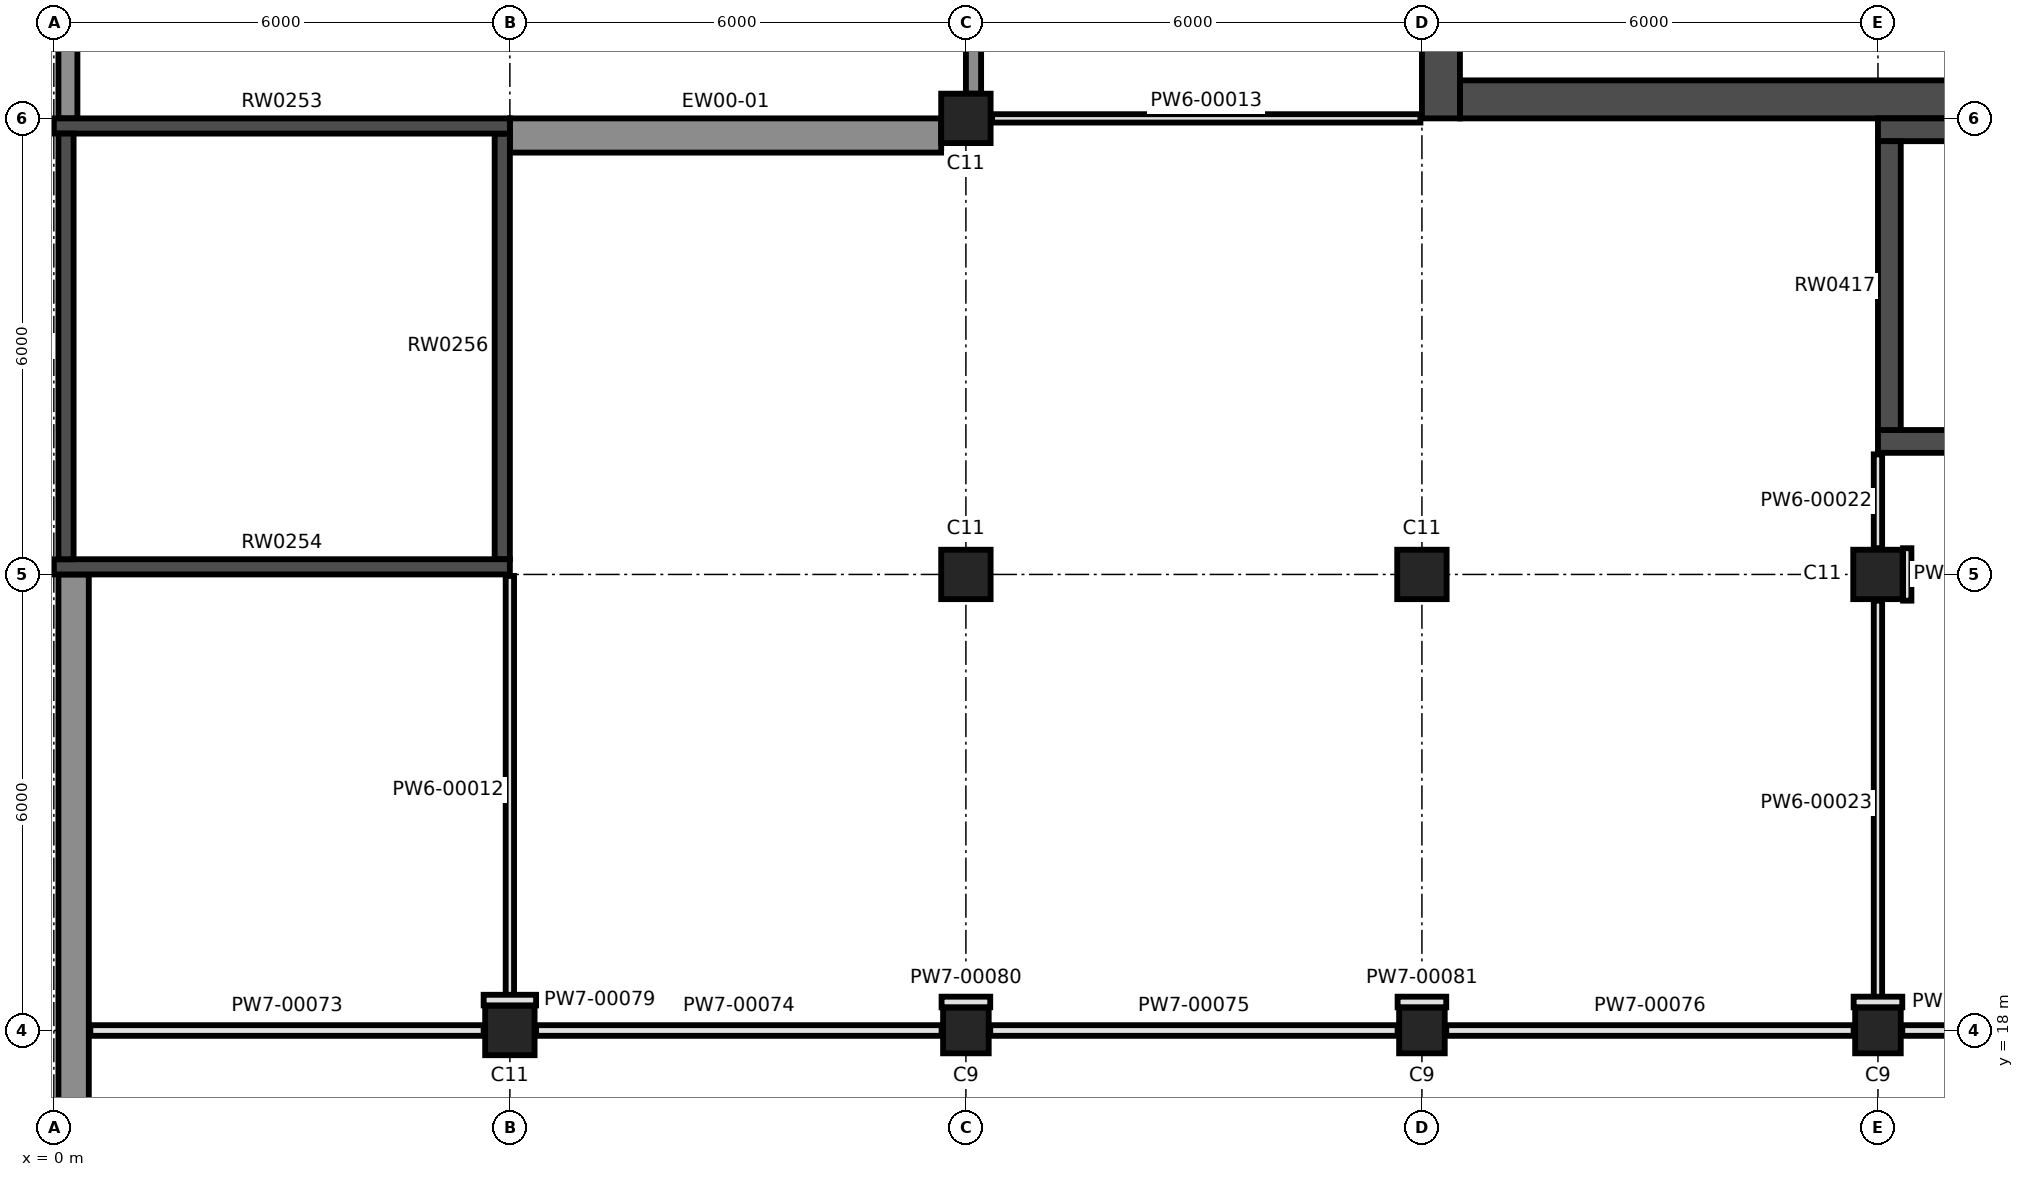
"""IFC4 building model, lengths in metres.
Left out: names, types, materials, properties, quantities, classifications, styles, units other than length and angle.
Written with IfcOpenShell. Run it as: python <this file> out.ifc"""

import sys

from ifc_helpers import new_model, si_unit, direction, frame, frame_2d, origin, origin_2d, place, context, subcontext, project, spatial, rectangle, extrude, element, fill, save


model = new_model("IFC4")
c1 = context("Model", 3, precision=1e-05, world=origin(), true_north=direction((0.0, 1.0)))
c2 = subcontext(c1, "Body", "Model", "MODEL_VIEW")
j1 = project(units=[si_unit("LENGTHUNIT", "METRE"), si_unit("PLANEANGLEUNIT", "RADIAN")], contexts=[c1])
p1 = place(None, origin())
s1 = spatial("IfcSite", under=j1, at=p1, CompositionType="ELEMENT")
p2 = place(p1, origin())
s2 = spatial("IfcBuilding", under=s1, at=p2, CompositionType="ELEMENT")
p3 = place(p2, origin())
s3 = spatial("IfcBuildingStorey", under=s2, at=p3, CompositionType="ELEMENT", Elevation=0.0)
p4 = place(p3, frame((6.0, 18.0, -0.3), z_axis=(0.0, 0.0, 1.0), x_axis=(1.0, 0.0, 0.0)))
e1 = element("IfcColumn", 1, at=p4, inside=s3, PredefinedType="COLUMN", context=c2, shape_type="SweptSolid", body=[
    extrude(rectangle(XDim=0.65, YDim=0.65, at=origin_2d()), origin(), (0.0, 0.0, 1.0), 7.3),
])
for number, where, z_axis, x_axis in (
    (2, (12.0, 18.0, -0.3), (0.0, 0.0, 1.0), (1.0, 0.0, 0.0)),
    (3, (18.0, 18.0, -0.3), (0.0, 0.0, 1.0), (1.0, 0.0, 0.0)),
    (4, (24.0, 18.0, -0.3), (0.0, 0.0, 1.0), (1.0, 0.0, 0.0)),
):
    element("IfcColumn", number, at=place(p3, frame(where, z_axis=z_axis, x_axis=x_axis)), inside=s3, PredefinedType="COLUMN", context=c2, shape_type="SweptSolid", body=[
        extrude(rectangle(XDim=0.6, YDim=0.6, at=origin_2d()), origin(), (0.0, 0.0, 1.0), 7.3),
    ])
for number, where, z_axis, x_axis in (
    (5, (12.0, 24.0, -0.3), (0.0, 0.0, 1.0), (1.0, 0.0, 0.0)),
    (6, (18.0, 24.0, -0.3), (0.0, 0.0, 1.0), (1.0, 0.0, 0.0)),
    (7, (24.0, 24.0, -0.3), (0.0, 0.0, 1.0), (1.0, 0.0, 0.0)),
    (8, (12.0, 30.0, -0.3), (0.0, 0.0, 1.0), (1.0, 0.0, 0.0)),
):
    element("IfcColumn", number, at=place(p3, frame(where, z_axis=z_axis, x_axis=x_axis)), inside=s3, PredefinedType="COLUMN", context=c2, shape_type="SweptSolid", body=[
        extrude(rectangle(XDim=0.65, YDim=0.65, at=origin_2d()), origin(), (0.0, 0.0, 1.0), 7.3),
    ])
p5 = place(p3, frame((0.0, 29.9, -0.3), z_axis=(0.0, 0.0, 1.0), x_axis=(1.0, 0.0, 0.0)))
e9 = element("IfcWall", 9, at=p5, inside=s3, PredefinedType="SHEAR", context=c2, shape_type="SweptSolid", body=[
    extrude(rectangle(XDim=6.0, YDim=0.2, at=frame_2d((3.0, 0.0))), origin(), (0.0, 0.0, 1.0), 7.3),
])
p6 = place(p5, frame((3.875, 0.0, 0.3)))
e10 = element("IfcOpeningElement", 10, at=p6, cuts=e9, PredefinedType="OPENING", context=c2, shape_type="SweptSolid", body=[
    extrude(rectangle(XDim=1.8, YDim=2.4, at=frame_2d((0.9, 1.2))), frame((0.0, 0.11, 0.0), z_axis=(0.0, -1.0, 0.0), x_axis=(1.0, 0.0, 0.0)), (0.0, 0.0, 1.0), 0.22),
])
p7 = place(p3, frame((0.0, 24.1, -0.3), z_axis=(0.0, 0.0, 1.0), x_axis=(1.0, 0.0, 0.0)))
e11 = element("IfcWall", 11, at=p7, inside=s3, PredefinedType="SHEAR", context=c2, shape_type="SweptSolid", body=[
    extrude(rectangle(XDim=6.0, YDim=0.2, at=frame_2d((3.0, 0.0))), origin(), (0.0, 0.0, 1.0), 7.3),
])
for number, where, z_axis, x_axis in (
    (12, (0.16, 24.2, -0.3), (0.0, 0.0, 1.0), (0.0, 1.0, 0.0)),
    (13, (5.9, 24.2, -0.3), (0.0, 0.0, 1.0), (0.0, 1.0, 0.0)),
):
    element("IfcWall", number, at=place(p3, frame(where, z_axis=z_axis, x_axis=x_axis)), inside=s3, PredefinedType="SHEAR", context=c2, shape_type="SweptSolid", body=[
        extrude(rectangle(XDim=5.6, YDim=0.2, at=frame_2d((2.8, 0.0))), origin(), (0.0, 0.0, 1.0), 7.3),
    ])
p8 = place(p3, frame((24.0, 29.85, -1.4), z_axis=(0.0, 0.0, 1.0), x_axis=(1.0, 0.0, 0.0)))
e14 = element("IfcWall", 14, at=p8, inside=s3, PredefinedType="SHEAR", context=c2, shape_type="SweptSolid", body=[
    extrude(rectangle(XDim=3.2, YDim=0.3, at=frame_2d((1.6, 0.0))), origin(), (0.0, 0.0, 1.0), 8.4),
])
p9 = place(p3, frame((24.0, 25.75, -1.4), z_axis=(0.0, 0.0, 1.0), x_axis=(1.0, 0.0, 0.0)))
e15 = element("IfcWall", 15, at=p9, inside=s3, PredefinedType="SHEAR", context=c2, shape_type="SweptSolid", body=[
    extrude(rectangle(XDim=3.2, YDim=0.3, at=frame_2d((1.6, 0.0))), origin(), (0.0, 0.0, 1.0), 8.4),
])
p10 = place(p9, frame((0.4, 0.0, 1.4)))
e16 = element("IfcOpeningElement", 16, at=p10, cuts=e15, PredefinedType="OPENING", context=c2, shape_type="SweptSolid", body=[
    extrude(rectangle(XDim=2.4, YDim=2.4, at=frame_2d((1.2, 1.2))), frame((0.0, 0.16, 0.0), z_axis=(0.0, -1.0, 0.0), x_axis=(1.0, 0.0, 0.0)), (0.0, 0.0, 1.0), 0.32),
])
p11 = place(p3, frame((24.15, 25.9, -1.4), z_axis=(0.0, 0.0, 1.0), x_axis=(0.0, 1.0, 0.0)))
e17 = element("IfcWall", 17, at=p11, inside=s3, PredefinedType="SHEAR", context=c2, shape_type="SweptSolid", body=[
    extrude(rectangle(XDim=3.8, YDim=0.3, at=frame_2d((1.9, 0.0))), origin(), (0.0, 0.0, 1.0), 8.4),
])
p12 = place(p3, frame((0.26, 6.0, -0.3), z_axis=(0.0, 0.0, 1.0), x_axis=(0.0, 1.0, 0.0)))
e18 = element("IfcWall", 18, at=p12, inside=s3, PredefinedType="SOLIDWALL", context=c2, shape_type="SweptSolid", body=[
    extrude(rectangle(XDim=18.0, YDim=0.4, at=frame_2d((9.0, 0.0))), origin(), (0.0, 0.0, 1.0), 7.3),
])
p13 = place(p3, frame((18.25, 30.0, -0.3), z_axis=(0.0, 0.0, 1.0), x_axis=(0.0, 1.0, 0.0)))
e19 = element("IfcWall", 19, at=p13, inside=s3, PredefinedType="SHEAR", context=c2, shape_type="SweptSolid", body=[
    extrude(rectangle(XDim=24.0, YDim=0.5, at=frame_2d((12.0, 0.0))), origin(), (0.0, 0.0, 1.0), 7.3),
])
p14 = place(p13, frame((16.95, 0.0, 0.3)))
e20 = element("IfcOpeningElement", 20, at=p14, cuts=e19, PredefinedType="OPENING", context=c2, shape_type="SweptSolid", body=[
    extrude(rectangle(XDim=2.1, YDim=2.4, at=frame_2d((1.05, 1.2))), frame((0.0, 0.26, 0.0), z_axis=(0.0, -1.0, 0.0), x_axis=(1.0, 0.0, 0.0)), (0.0, 0.0, 1.0), 0.52),
])
p15 = place(p13, frame((2.25, 0.0, 0.3)))
e21 = element("IfcOpeningElement", 21, at=p15, cuts=e19, PredefinedType="OPENING", context=c2, shape_type="SweptSolid", body=[
    extrude(rectangle(XDim=1.5, YDim=2.1, at=frame_2d((0.75, 1.05))), frame((0.0, 0.26, 0.0), z_axis=(0.0, -1.0, 0.0), x_axis=(1.0, 0.0, 0.0)), (0.0, 0.0, 1.0), 0.52),
])
p16 = place(p3, frame((18.5, 30.25, -0.3), z_axis=(0.0, 0.0, 1.0), x_axis=(1.0, 0.0, 0.0)))
e22 = element("IfcWall", 22, at=p16, inside=s3, PredefinedType="SHEAR", context=c2, shape_type="SweptSolid", body=[
    extrude(rectangle(XDim=29.0, YDim=0.5, at=frame_2d((14.5, 0.0))), origin(), (0.0, 0.0, 1.0), 7.3),
])
p17 = place(p3, frame((0.185, 30.0, -0.3), z_axis=(0.0, 0.0, 1.0), x_axis=(0.0, 1.0, 0.0)))
e23 = element("IfcWall", 23, at=p17, inside=s3, PredefinedType="SOLIDWALL", context=c2, shape_type="SweptSolid", body=[
    extrude(rectangle(XDim=72.0, YDim=0.25, at=frame_2d((36.0, 0.0))), origin(), (0.0, 0.0, 1.0), 3.3),
])
p18 = place(p3, frame((6.0, 29.775, 0.0), z_axis=(0.0, 0.0, 1.0), x_axis=(1.0, 0.0, 0.0)))
e24 = element("IfcWall", 24, at=p18, inside=s3, PredefinedType="SOLIDWALL", context=c2, shape_type="SweptSolid", body=[
    extrude(rectangle(XDim=5.675, YDim=0.45, at=frame_2d((2.837, 0.0))), origin(), (0.0, 0.0, 1.0), 6.05),
])
p19 = place(p18, frame((1.538, 0.0, 0.9)))
e25 = element("IfcOpeningElement", 25, at=p19, cuts=e24, PredefinedType="OPENING", context=c2, shape_type="SweptSolid", body=[
    extrude(rectangle(XDim=1.05, YDim=4.95, at=frame_2d((0.525, 2.475))), frame((0.0, 0.235, 0.0), z_axis=(0.0, -1.0, 0.0), x_axis=(1.0, 0.0, 0.0)), (0.0, 0.0, 1.0), 0.47),
])
p20 = place(p18, frame((3.088, 0.0, 0.9)))
e26 = element("IfcOpeningElement", 26, at=p20, cuts=e24, PredefinedType="OPENING", context=c2, shape_type="SweptSolid", body=[
    extrude(rectangle(XDim=1.05, YDim=4.95, at=frame_2d((0.525, 2.475))), frame((0.0, 0.235, 0.0), z_axis=(0.0, -1.0, 0.0), x_axis=(1.0, 0.0, 0.0)), (0.0, 0.0, 1.0), 0.47),
])
p21 = place(p3, frame((12.1, 30.325, 0.0), z_axis=(0.0, 0.0, 1.0), x_axis=(0.0, 1.0, 0.0)))
e27 = element("IfcWall", 27, at=p21, inside=s3, PredefinedType="SOLIDWALL", context=c2, shape_type="SweptSolid", body=[
    extrude(rectangle(XDim=5.675, YDim=0.2, at=frame_2d((2.837, 0.0))), origin(), (0.0, 0.0, 1.0), 6.05),
])
p22 = place(p21, frame((1.745, 0.0, 0.0)))
e28 = element("IfcOpeningElement", 28, at=p22, cuts=e27, PredefinedType="OPENING", context=c2, shape_type="SweptSolid", body=[
    extrude(rectangle(XDim=1.8, YDim=2.4, at=frame_2d((0.9, 1.2))), frame((0.0, 0.11, 0.0), z_axis=(0.0, -1.0, 0.0), x_axis=(1.0, 0.0, 0.0)), (0.0, 0.0, 1.0), 0.22),
])
p23 = place(p21, frame((1.745, 0.0, 2.5)))
e29 = element("IfcOpeningElement", 29, at=p23, cuts=e27, PredefinedType="OPENING", context=c2, shape_type="SweptSolid", body=[
    extrude(rectangle(XDim=1.8, YDim=3.2, at=frame_2d((0.9, 1.6))), frame((0.0, 0.11, 0.0), z_axis=(0.0, -1.0, 0.0), x_axis=(1.0, 0.0, 0.0)), (0.0, 0.0, 1.0), 0.22),
])
p24 = place(p21, frame((0.2, 0.0, 0.1)))
e30 = element("IfcOpeningElement", 30, at=p24, cuts=e27, PredefinedType="OPENING", context=c2, shape_type="SweptSolid", body=[
    extrude(rectangle(XDim=1.545, YDim=5.6, at=frame_2d((0.772, 2.8))), frame((0.0, 0.11, 0.0), z_axis=(0.0, -1.0, 0.0), x_axis=(1.0, 0.0, 0.0)), (0.0, 0.0, 1.0), 0.22),
])
p25 = place(p21, frame((3.545, 0.0, 0.1)))
e31 = element("IfcOpeningElement", 31, at=p25, cuts=e27, PredefinedType="OPENING", context=c2, shape_type="SweptSolid", body=[
    extrude(rectangle(XDim=1.93, YDim=5.6, at=frame_2d((0.965, 2.8))), frame((0.0, 0.11, 0.0), z_axis=(0.0, -1.0, 0.0), x_axis=(1.0, 0.0, 0.0)), (0.0, 0.0, 1.0), 0.22),
])
for number, where, z_axis, x_axis in (
    (32, (6.0, 18.345, 0.0), (0.0, 0.0, 1.0), (0.0, 1.0, 0.0)),
    (33, (12.345, 30.0, 0.0), (0.0, 0.0, 1.0), (1.0, 0.0, 0.0)),
):
    element("IfcWall", number, at=place(p3, frame(where, z_axis=z_axis, x_axis=x_axis)), inside=s3, PredefinedType="PARTITIONING", context=c2, shape_type="SweptSolid", body=[
        extrude(rectangle(XDim=5.635, YDim=0.11, at=frame_2d((2.817, 0.0))), origin(), (0.0, 0.0, 1.0), 6.05),
    ])
p26 = place(p3, frame((24.0, 24.345, 0.0), z_axis=(0.0, 0.0, 1.0), x_axis=(0.0, 1.0, 0.0)))
e34 = element("IfcWall", 34, at=p26, inside=s3, PredefinedType="PARTITIONING", context=c2, shape_type="SweptSolid", body=[
    extrude(rectangle(XDim=1.235, YDim=0.11, at=frame_2d((0.618, 0.0))), origin(), (0.0, 0.0, 1.0), 6.05),
])
p27 = place(p3, frame((24.0, 18.32, 0.0), z_axis=(0.0, 0.0, 1.0), x_axis=(0.0, 1.0, 0.0)))
e35 = element("IfcWall", 35, at=p27, inside=s3, PredefinedType="PARTITIONING", context=c2, shape_type="SweptSolid", body=[
    extrude(rectangle(XDim=5.335, YDim=0.11, at=frame_2d((2.667, 0.0))), origin(), (0.0, 0.0, 1.0), 6.05),
])
p28 = place(p3, frame((24.385, 23.655, 0.0), z_axis=(0.0, 0.0, 1.0), x_axis=(0.0, 1.0, 0.0)))
e36 = element("IfcWall", 36, at=p28, inside=s3, PredefinedType="PARTITIONING", context=c2, shape_type="SweptSolid", body=[
    extrude(rectangle(XDim=0.69, YDim=0.11, at=frame_2d((0.345, 0.0))), origin(), (0.0, 0.0, 1.0), 6.05),
])
p29 = place(p3, frame((0.48, 18.0, 0.0), z_axis=(0.0, 0.0, 1.0), x_axis=(1.0, 0.0, 0.0)))
e37 = element("IfcWall", 37, at=p29, inside=s3, PredefinedType="PARTITIONING", context=c2, shape_type="SweptSolid", body=[
    extrude(rectangle(XDim=5.175, YDim=0.14, at=frame_2d((2.587, 0.0))), origin(), (0.0, 0.0, 1.0), 6.05),
])
p30 = place(p29, frame((2.07, 0.0, 0.0)))
e38 = element("IfcOpeningElement", 38, at=p30, cuts=e37, PredefinedType="OPENING", context=c2, shape_type="SweptSolid", body=[
    extrude(rectangle(XDim=0.92, YDim=2.04, at=frame_2d((0.46, 1.02))), frame((0.0, 0.08, 0.0), z_axis=(0.0, -1.0, 0.0), x_axis=(1.0, 0.0, 0.0)), (0.0, 0.0, 1.0), 0.16),
])
p31 = place(p3, frame((6.345, 18.0, 0.0), z_axis=(0.0, 0.0, 1.0), x_axis=(1.0, 0.0, 0.0)))
e39 = element("IfcWall", 39, at=p31, inside=s3, PredefinedType="PARTITIONING", context=c2, shape_type="SweptSolid", body=[
    extrude(rectangle(XDim=5.335, YDim=0.14, at=frame_2d((2.667, 0.0))), origin(), (0.0, 0.0, 1.0), 6.05),
])
p32 = place(p3, frame((12.32, 18.0, 0.0), z_axis=(0.0, 0.0, 1.0), x_axis=(1.0, 0.0, 0.0)))
e40 = element("IfcWall", 40, at=p32, inside=s3, PredefinedType="PARTITIONING", context=c2, shape_type="SweptSolid", body=[
    extrude(rectangle(XDim=5.36, YDim=0.14, at=frame_2d((2.68, 0.0))), origin(), (0.0, 0.0, 1.0), 6.05),
])
p33 = place(p32, frame((1.43, 0.0, 0.0)))
e41 = element("IfcOpeningElement", 41, at=p33, cuts=e40, PredefinedType="OPENING", context=c2, shape_type="SweptSolid", body=[
    extrude(rectangle(XDim=2.4, YDim=3.0, at=frame_2d((1.2, 1.5))), frame((0.0, 0.08, 0.0), z_axis=(0.0, -1.0, 0.0), x_axis=(1.0, 0.0, 0.0)), (0.0, 0.0, 1.0), 0.16),
])
p34 = place(p3, frame((18.32, 18.0, 0.0), z_axis=(0.0, 0.0, 1.0), x_axis=(1.0, 0.0, 0.0)))
e42 = element("IfcWall", 42, at=p34, inside=s3, PredefinedType="PARTITIONING", context=c2, shape_type="SweptSolid", body=[
    extrude(rectangle(XDim=5.36, YDim=0.14, at=frame_2d((2.68, 0.0))), origin(), (0.0, 0.0, 1.0), 6.05),
])
p35 = place(p3, frame((24.32, 18.0, 0.0), z_axis=(0.0, 0.0, 1.0), x_axis=(1.0, 0.0, 0.0)))
e43 = element("IfcWall", 43, at=p35, inside=s3, PredefinedType="PARTITIONING", context=c2, shape_type="SweptSolid", body=[
    extrude(rectangle(XDim=5.335, YDim=0.14, at=frame_2d((2.667, 0.0))), origin(), (0.0, 0.0, 1.0), 6.05),
])
p36 = place(p35, frame((1.73, 0.0, 0.0)))
e44 = element("IfcOpeningElement", 44, at=p36, cuts=e43, PredefinedType="OPENING", context=c2, shape_type="SweptSolid", body=[
    extrude(rectangle(XDim=1.8, YDim=2.1, at=frame_2d((0.9, 1.05))), frame((0.0, 0.08, 0.0), z_axis=(0.0, -1.0, 0.0), x_axis=(1.0, 0.0, 0.0)), (0.0, 0.0, 1.0), 0.16),
])
p37 = place(p3, frame((5.655, 18.4, 0.0), z_axis=(0.0, 0.0, 1.0), x_axis=(1.0, 0.0, 0.0)))
e45 = element("IfcWall", 45, at=p37, inside=s3, PredefinedType="PARTITIONING", context=c2, shape_type="SweptSolid", body=[
    extrude(rectangle(XDim=0.69, YDim=0.14, at=frame_2d((0.345, 0.0))), origin(), (0.0, 0.0, 1.0), 6.05),
])
for number, where, z_axis, x_axis in (
    (46, (11.68, 18.375, 0.0), (0.0, 0.0, 1.0), (1.0, 0.0, 0.0)),
    (47, (17.68, 18.375, 0.0), (0.0, 0.0, 1.0), (1.0, 0.0, 0.0)),
    (48, (23.68, 18.375, 0.0), (0.0, 0.0, 1.0), (1.0, 0.0, 0.0)),
):
    element("IfcWall", number, at=place(p3, frame(where, z_axis=z_axis, x_axis=x_axis)), inside=s3, PredefinedType="PARTITIONING", context=c2, shape_type="SweptSolid", body=[
        extrude(rectangle(XDim=0.64, YDim=0.14, at=frame_2d((0.32, 0.0))), origin(), (0.0, 0.0, 1.0), 6.05),
    ])
p38 = place(p19, origin())
e49 = element("IfcWindow", 49, at=p38, inside=s3, PartitioningType="SINGLE_PANEL", PredefinedType="WINDOW", context=c2, shape_type="SweptSolid", body=[
    extrude(rectangle(XDim=1.05, YDim=4.95, at=frame_2d((0.525, 2.475))), frame((0.0, 0.03, 0.0), z_axis=(0.0, -1.0, 0.0), x_axis=(1.0, 0.0, 0.0)), (0.0, 0.0, 1.0), 0.06),
])
fill(e25, e49)
p39 = place(p20, origin())
e50 = element("IfcWindow", 50, at=p39, inside=s3, PartitioningType="SINGLE_PANEL", PredefinedType="WINDOW", context=c2, shape_type="SweptSolid", body=[
    extrude(rectangle(XDim=1.05, YDim=4.95, at=frame_2d((0.525, 2.475))), frame((0.0, 0.03, 0.0), z_axis=(0.0, -1.0, 0.0), x_axis=(1.0, 0.0, 0.0)), (0.0, 0.0, 1.0), 0.06),
])
fill(e26, e50)
p40 = place(p24, origin())
e51 = element("IfcWindow", 51, at=p40, inside=s3, PartitioningType="SINGLE_PANEL", PredefinedType="WINDOW", context=c2, shape_type="SweptSolid", body=[
    extrude(rectangle(XDim=1.545, YDim=5.6, at=frame_2d((0.772, 2.8))), frame((0.0, 0.03, 0.0), z_axis=(0.0, -1.0, 0.0), x_axis=(1.0, 0.0, 0.0)), (0.0, 0.0, 1.0), 0.06),
])
fill(e30, e51)
p41 = place(p6, origin())
e52 = element("IfcDoor", 52, at=p41, inside=s3, OperationType="DOUBLE_DOOR_SINGLE_SWING", PredefinedType="DOOR", context=c2, shape_type="SweptSolid", body=[
    extrude(rectangle(XDim=1.8, YDim=2.4, at=frame_2d((0.9, 1.2))), frame((0.0, 0.025, 0.0), z_axis=(0.0, -1.0, 0.0), x_axis=(1.0, 0.0, 0.0)), (0.0, 0.0, 1.0), 0.05),
])
fill(e10, e52)
p42 = place(p33, frame((2.4, 0.0, 0.0), z_axis=(0.0, 0.0, 1.0), x_axis=(-1.0, 0.0, 0.0)))
e53 = element("IfcDoor", 53, at=p42, inside=s3, OperationType="DOUBLE_DOOR_SINGLE_SWING", PredefinedType="DOOR", context=c2, shape_type="SweptSolid", body=[
    extrude(rectangle(XDim=2.4, YDim=3.0, at=frame_2d((1.2, 1.5))), frame((0.0, 0.025, 0.0), z_axis=(0.0, -1.0, 0.0), x_axis=(1.0, 0.0, 0.0)), (0.0, 0.0, 1.0), 0.05),
])
fill(e41, e53)
p43 = place(p30, origin())
e54 = element("IfcDoor", 54, at=p43, inside=s3, OperationType="SINGLE_SWING_RIGHT", PredefinedType="DOOR", context=c2, shape_type="SweptSolid", body=[
    extrude(rectangle(XDim=0.92, YDim=2.04, at=frame_2d((0.46, 1.02))), frame((0.0, 0.025, 0.0), z_axis=(0.0, -1.0, 0.0), x_axis=(1.0, 0.0, 0.0)), (0.0, 0.0, 1.0), 0.05),
])
fill(e38, e54)
p44 = place(p10, origin())
e55 = element("IfcDoor", 55, at=p44, inside=s3, OperationType="DOUBLE_DOOR_SLIDING", PredefinedType="DOOR", context=c2, shape_type="SweptSolid", body=[
    extrude(rectangle(XDim=2.4, YDim=2.4, at=frame_2d((1.2, 1.2))), frame((0.0, 0.025, 0.0), z_axis=(0.0, -1.0, 0.0), x_axis=(1.0, 0.0, 0.0)), (0.0, 0.0, 1.0), 0.05),
])
fill(e16, e55)
save(model, sys.argv[1])
